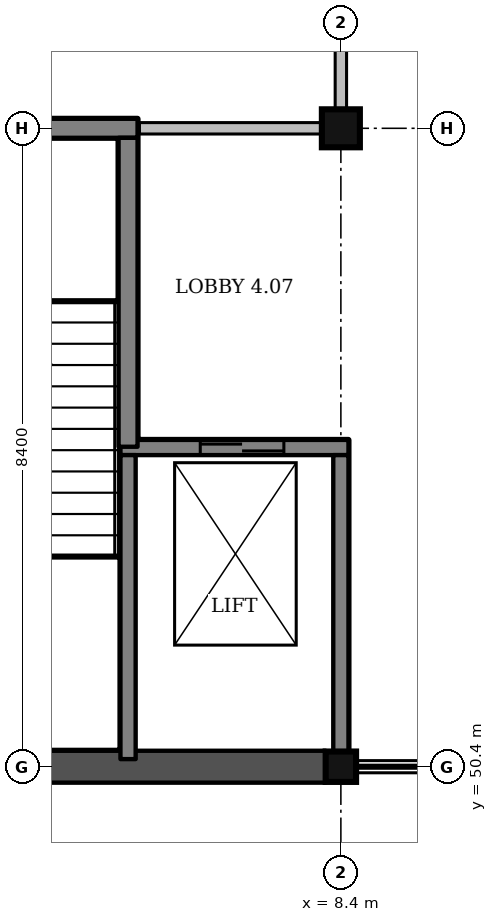
"""IFC4 building model, lengths in metres.
Left out: names, types, materials, properties, quantities, classifications, styles, units other than length and angle.
Written with IfcOpenShell. Run it as: python <this file> out.ifc"""

import sys

from ifc_helpers import new_model, si_unit, direction, frame, frame_2d, origin, origin_2d, place, context, subcontext, project, spatial, rectangle, extrude, element, fill, save


model = new_model("IFC4")
c1 = context("Model", 3, precision=1e-05, world=origin(), true_north=direction((0.0, 1.0)))
c2 = subcontext(c1, "Body", "Model", "MODEL_VIEW")
j1 = project(units=[si_unit("LENGTHUNIT", "METRE"), si_unit("PLANEANGLEUNIT", "RADIAN")], contexts=[c1])
p1 = place(None, origin())
s1 = spatial("IfcSite", under=j1, at=p1, CompositionType="ELEMENT")
p2 = place(p1, origin())
s2 = spatial("IfcBuilding", under=s1, at=p2, CompositionType="ELEMENT")
p3 = place(p2, frame((0.0, 0.0, 18.0)))
s3 = spatial("IfcBuildingStorey", under=s2, at=p3, CompositionType="ELEMENT", Elevation=18.0)
p4 = place(p3, frame((8.4, 50.4, 0.0), z_axis=(0.0, 0.0, 1.0), x_axis=(1.0, 0.0, 0.0)))
e1 = element("IfcColumn", 1, at=p4, inside=s3, PredefinedType="COLUMN", context=c2, shape_type="SweptSolid", body=[
    extrude(rectangle(XDim=0.4, YDim=0.4, at=origin_2d()), origin(), (0.0, 0.0, 1.0), 4.5),
])
p5 = place(p3, frame((8.4, 58.8, 0.0), z_axis=(0.0, 0.0, 1.0), x_axis=(1.0, 0.0, 0.0)))
e2 = element("IfcColumn", 2, at=p5, inside=s3, PredefinedType="COLUMN", context=c2, shape_type="SweptSolid", body=[
    extrude(rectangle(XDim=0.5, YDim=0.5, at=origin_2d()), origin(), (0.0, 0.0, 1.0), 4.5),
])
p6 = place(p3, frame((5.5, 54.6, 0.0), z_axis=(0.0, 0.0, 1.0), x_axis=(1.0, 0.0, 0.0)))
e3 = element("IfcWall", 3, at=p6, inside=s3, PredefinedType="SHEAR", context=c2, shape_type="SweptSolid", body=[
    extrude(rectangle(XDim=3.0, YDim=0.2, at=frame_2d((1.5, 0.0))), origin(), (0.0, 0.0, 1.0), 4.5),
])
p7 = place(p6, frame((1.05, 0.0, 0.0)))
e4 = element("IfcOpeningElement", 4, at=p7, cuts=e3, PredefinedType="OPENING", context=c2, shape_type="SweptSolid", body=[
    extrude(rectangle(XDim=1.1, YDim=2.1, at=frame_2d((0.55, 1.05))), frame((0.0, 0.11, 0.0), z_axis=(0.0, -1.0, 0.0), x_axis=(1.0, 0.0, 0.0)), (0.0, 0.0, 1.0), 0.22),
])
p8 = place(p3, frame((5.6, 50.5, 0.0), z_axis=(0.0, 0.0, 1.0), x_axis=(0.0, 1.0, 0.0)))
e5 = element("IfcWall", 5, at=p8, inside=s3, PredefinedType="SHEAR", context=c2, shape_type="SweptSolid", body=[
    extrude(rectangle(XDim=4.0, YDim=0.2, at=frame_2d((2.0, 0.0))), origin(), (0.0, 0.0, 1.0), 4.5),
])
p9 = place(p3, frame((8.4, 50.6, 0.0), z_axis=(0.0, 0.0, 1.0), x_axis=(0.0, 1.0, 0.0)))
e6 = element("IfcWall", 6, at=p9, inside=s3, PredefinedType="SHEAR", context=c2, shape_type="SweptSolid", body=[
    extrude(rectangle(XDim=3.9, YDim=0.2, at=frame_2d((1.95, 0.0))), origin(), (0.0, 0.0, 1.0), 4.5),
])
p10 = place(p3, frame((0.2, 58.8, 0.0), z_axis=(0.0, 0.0, 1.0), x_axis=(1.0, 0.0, 0.0)))
e7 = element("IfcWall", 7, at=p10, inside=s3, PredefinedType="SHEAR", context=c2, shape_type="SweptSolid", body=[
    extrude(rectangle(XDim=5.525, YDim=0.25, at=frame_2d((2.763, 0.0))), origin(), (0.0, 0.0, 1.0), 4.5),
])
p11 = place(p10, frame((2.15, 0.0, 0.0)))
e8 = element("IfcOpeningElement", 8, at=p11, cuts=e7, PredefinedType="OPENING", context=c2, shape_type="SweptSolid", body=[
    extrude(rectangle(XDim=1.0, YDim=2.1, at=frame_2d((0.5, 1.05))), frame((0.0, 0.135, 0.0), z_axis=(0.0, -1.0, 0.0), x_axis=(1.0, 0.0, 0.0)), (0.0, 0.0, 1.0), 0.27),
])
p12 = place(p3, frame((5.6, 54.61, 0.0), z_axis=(0.0, 0.0, 1.0), x_axis=(0.0, 1.0, 0.0)))
e9 = element("IfcWall", 9, at=p12, inside=s3, PredefinedType="SHEAR", context=c2, shape_type="SweptSolid", body=[
    extrude(rectangle(XDim=4.065, YDim=0.25, at=frame_2d((2.032, 0.0))), origin(), (0.0, 0.0, 1.0), 4.5),
])
p13 = place(p3, frame((4.525, 50.4, 0.0), z_axis=(0.0, 0.0, 1.0), x_axis=(1.0, 0.0, 0.0)))
e10 = element("IfcWall", 10, at=p13, inside=s3, PredefinedType="SOLIDWALL", context=c2, shape_type="SweptSolid", body=[
    extrude(rectangle(XDim=3.675, YDim=0.42, at=frame_2d((1.837, 0.0))), origin(), (0.0, 0.0, 1.0), 3.65),
])
p14 = place(p3, frame((5.75, 58.8, 0.0), z_axis=(0.0, 0.0, 1.0), x_axis=(1.0, 0.0, 0.0)))
e11 = element("IfcWall", 11, at=p14, inside=s3, PredefinedType="PARTITIONING", context=c2, shape_type="SweptSolid", body=[
    extrude(rectangle(XDim=2.4, YDim=0.15, at=frame_2d((1.2, 0.0))), origin(), (0.0, 0.0, 1.0), 3.5),
])
p15 = place(p3, frame((8.4, 59.05, 0.0), z_axis=(0.0, 0.0, 1.0), x_axis=(0.0, 1.0, 0.0)))
e12 = element("IfcWall", 12, at=p15, inside=s3, PredefinedType="PARTITIONING", context=c2, shape_type="SweptSolid", body=[
    extrude(rectangle(XDim=7.9, YDim=0.15, at=frame_2d((3.95, 0.0))), origin(), (0.0, 0.0, 1.0), 3.4),
])
p16 = place(p15, frame((3.45, 0.0, 0.0)))
e13 = element("IfcOpeningElement", 13, at=p16, cuts=e12, PredefinedType="OPENING", context=c2, shape_type="SweptSolid", body=[
    extrude(rectangle(XDim=1.0, YDim=2.1, at=frame_2d((0.5, 1.05))), frame((0.0, 0.085, 0.0), z_axis=(0.0, -1.0, 0.0), x_axis=(1.0, 0.0, 0.0)), (0.0, 0.0, 1.0), 0.17),
])
p17 = place(p7, origin())
e14 = element("IfcDoor", 14, at=p17, inside=s3, OperationType="SLIDING_TO_LEFT", PredefinedType="DOOR", context=c2, shape_type="SweptSolid", body=[
    extrude(rectangle(XDim=1.1, YDim=2.1, at=frame_2d((0.55, 1.05))), frame((0.0, 0.025, 0.0), z_axis=(0.0, -1.0, 0.0), x_axis=(1.0, 0.0, 0.0)), (0.0, 0.0, 1.0), 0.05),
])
fill(e4, e14)
save(model, sys.argv[1])
